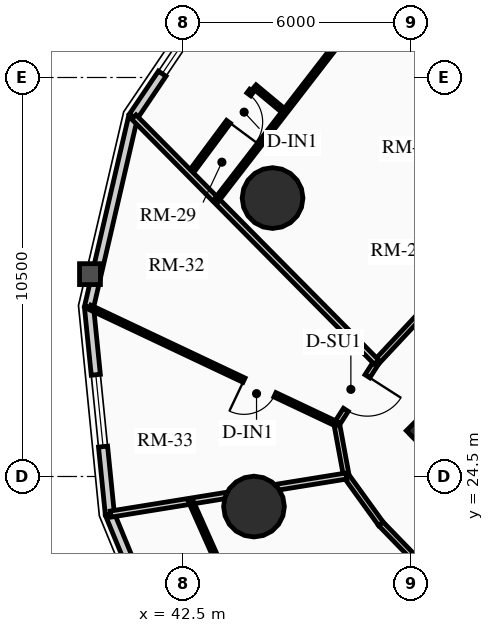
"""IFC4 building model, lengths in metres.
Left out: names, types, materials, properties, quantities, classifications, styles, units other than length and angle.
Written with IfcOpenShell. Run it as: python <this file> out.ifc"""

import sys

from ifc_helpers import new_model, si_unit, direction, frame, frame_2d, origin, origin_2d, place, context, subcontext, project, spatial, rectangle, circle, extrude, source, transform, mapped, element, fill, save


model = new_model("IFC4")
c1 = context("Model", 3, precision=1e-05, world=origin(), true_north=direction((0.0, 1.0)))
c2 = subcontext(c1, "Body", "Model", "MODEL_VIEW")
j1 = project(units=[si_unit("LENGTHUNIT", "METRE"), si_unit("PLANEANGLEUNIT", "RADIAN")], contexts=[c1])
p1 = place(None, origin())
s1 = spatial("IfcSite", under=j1, at=p1, CompositionType="ELEMENT")
p2 = place(p1, origin())
s2 = spatial("IfcBuilding", under=s1, at=p2, CompositionType="ELEMENT")
p3 = place(p2, frame((0.0, 0.0, 62.74)))
s3 = spatial("IfcBuildingStorey", under=s2, at=p3, CompositionType="ELEMENT", Elevation=62.74)
p4 = place(p3, frame((58.773, 15.661, 0.0), z_axis=(0.0, 0.0, 1.0), x_axis=(-0.707106781187, 0.707106781187, 0.0)))
e1 = element("IfcWall", 1, at=p4, inside=s3, PredefinedType="SHEAR", context=c2, shape_type="SweptSolid", body=[
    extrude(rectangle(XDim=14.3, YDim=0.5, at=frame_2d((7.15, 0.0))), origin(), (0.0, 0.0, 1.0), 2.91),
])
p5 = place(p3, frame((48.976, 25.706, 0.0), z_axis=(0.0, 0.0, 1.0), x_axis=(0.707106781187, 0.707106781187, 0.0)))
e2 = element("IfcColumn", 2, at=p5, inside=s3, PredefinedType="COLUMN", context=c2, shape_type="SweptSolid", body=[
    extrude(rectangle(XDim=0.85, YDim=0.85, at=origin_2d()), origin(), (0.0, 0.0, 1.0), 2.91),
])
for number, where, z_axis, x_axis in (
    (3, (44.854, 31.827, 0.0), (0.0, 0.0, 1.0), (1.0, 0.0, 0.0)),
    (4, (44.365, 23.709, 0.0), (0.0, 0.0, 1.0), (1.0, 0.0, 0.0)),
):
    element("IfcColumn", number, at=place(p3, frame(where, z_axis=z_axis, x_axis=x_axis)), inside=s3, PredefinedType="USERDEFINED", context=c2, shape_type="SweptSolid", body=[
        extrude(circle(Radius=0.8, at=origin_2d()), origin(), (0.0, 0.0, 1.0), 2.91),
    ])
p6 = place(p3, frame((41.186, 33.969, 0.0), z_axis=(0.0, 0.0, 1.0), x_axis=(0.559638693991, 0.828736708604, 0.0)))
e5 = element("IfcWall", 5, at=p6, inside=s3, PredefinedType="SOLIDWALL", context=c2, shape_type="SweptSolid", body=[
    extrude(rectangle(XDim=4.93, YDim=0.24, at=frame_2d((2.465, 0.0))), origin(), (0.0, 0.0, 1.0), 2.079),
])
m1 = source(origin(), c2, "Body", "SweptSolid", [
    extrude(rectangle(XDim=2.2, YDim=1.35, at=frame_2d((1.1, 0.675))), frame((0.0, 0.13, 0.0), z_axis=(0.0, -1.0, 0.0), x_axis=(1.0, 0.0, 0.0)), (0.0, 0.0, 1.0), 0.26),
])
p7 = place(p6, frame((1.365, 0.0, 0.65)))
e6 = element("IfcOpeningElement", 6, at=p7, cuts=e5, PredefinedType="OPENING", context=c2, shape_type="MappedRepresentation", body=[
    mapped(m1, transform((0.0, 0.0, 0.0), x_axis=(1.0, 0.0, 0.0), y_axis=(0.0, 1.0, 0.0), z_axis=(0.0, 0.0, 1.0), scale=1.0)),
])
p8 = place(p3, frame((40.024, 28.957, 0.0), z_axis=(0.0, 0.0, 1.0), x_axis=(0.225833060959, 0.974166016949, 0.0)))
e7 = element("IfcWall", 7, at=p8, inside=s3, PredefinedType="SOLIDWALL", context=c2, shape_type="SweptSolid", body=[
    extrude(rectangle(XDim=5.146, YDim=0.24, at=frame_2d((2.573, 0.0))), origin(), (0.0, 0.0, 1.0), 2.079),
])
p9 = place(p3, frame((40.572, 23.507, 0.0), z_axis=(0.0, 0.0, 1.0), x_axis=(-0.100165739718, 0.994970765694, 0.0)))
e8 = element("IfcWall", 8, at=p9, inside=s3, PredefinedType="SOLIDWALL", context=c2, shape_type="SweptSolid", body=[
    extrude(rectangle(XDim=5.477, YDim=0.24, at=frame_2d((2.738, 0.0))), origin(), (0.0, 0.0, 1.0), 2.079),
])
m2 = source(origin(), c2, "Body", "SweptSolid", [
    extrude(rectangle(XDim=1.9, YDim=1.35, at=frame_2d((0.95, 0.675))), frame((0.0, 0.13, 0.0), z_axis=(0.0, -1.0, 0.0), x_axis=(1.0, 0.0, 0.0)), (0.0, 0.0, 1.0), 0.26),
])
p10 = place(p9, frame((1.788, 0.0, 0.65)))
e9 = element("IfcOpeningElement", 9, at=p10, cuts=e8, PredefinedType="OPENING", context=c2, shape_type="MappedRepresentation", body=[
    mapped(m2, transform((0.0, 0.0, 0.0), x_axis=(1.0, 0.0, 0.0), y_axis=(0.0, 1.0, 0.0), z_axis=(0.0, 0.0, 1.0), scale=1.0)),
])
p11 = place(p3, frame((42.778, 18.156, 0.0), z_axis=(0.0, 0.0, 1.0), x_axis=(-0.381027682565, 0.924563629567, 0.0)))
e10 = element("IfcWall", 10, at=p11, inside=s3, PredefinedType="SOLIDWALL", context=c2, shape_type="SweptSolid", body=[
    extrude(rectangle(XDim=5.789, YDim=0.24, at=frame_2d((2.894, 0.0))), origin(), (0.0, 0.0, 1.0), 2.079),
])
p12 = place(p11, frame((1.794, 0.0, 0.65)))
e11 = element("IfcOpeningElement", 11, at=p12, cuts=e10, PredefinedType="OPENING", context=c2, shape_type="MappedRepresentation", body=[
    mapped(m1, transform((0.0, 0.0, 0.0), x_axis=(1.0, 0.0, 0.0), y_axis=(0.0, 1.0, 0.0), z_axis=(0.0, 0.0, 1.0), scale=1.0)),
])
p13 = place(p3, frame((52.043, 32.28, 0.0), z_axis=(0.0, 0.0, 1.0), x_axis=(-0.682606081633, -0.730786519661, 0.0)))
e12 = element("IfcWall", 12, at=p13, inside=s3, PredefinedType="PARTITIONING", context=c2, shape_type="SweptSolid", body=[
    extrude(rectangle(XDim=6.527, YDim=0.15, at=frame_2d((3.263, 0.0))), origin(), (0.0, 0.0, 1.0), 2.079),
])
p14 = place(p3, frame((47.588, 27.51, 0.0), z_axis=(0.0, 0.0, 1.0), x_axis=(-0.540202619347, -0.841534984449, 0.0)))
e13 = element("IfcWall", 13, at=p14, inside=s3, PredefinedType="PARTITIONING", context=c2, shape_type="SweptSolid", body=[
    extrude(rectangle(XDim=1.935, YDim=0.15, at=frame_2d((0.967, 0.0))), origin(), (0.0, 0.0, 1.0), 2.079),
])
m3 = source(origin(), c2, "Body", "SweptSolid", [
    extrude(rectangle(XDim=1.05, YDim=2.015, at=frame_2d((0.525, 1.007))), frame((0.0, 0.085, 0.0), z_axis=(0.0, -1.0, 0.0), x_axis=(1.0, 0.0, 0.0)), (0.0, 0.0, 1.0), 0.17),
])
p15 = place(p14, frame((0.442, 0.0, 0.0)))
e14 = element("IfcOpeningElement", 14, at=p15, cuts=e13, PredefinedType="OPENING", context=c2, shape_type="MappedRepresentation", body=[
    mapped(m3, transform((0.0, 0.0, 0.0), x_axis=(1.0, 0.0, 0.0), y_axis=(0.0, 1.0, 0.0), z_axis=(0.0, 0.0, 1.0), scale=1.0)),
])
p16 = place(p3, frame((46.543, 25.882, 0.0), z_axis=(0.0, 0.0, 1.0), x_axis=(0.181153502579, -0.983454832976, 0.0)))
e15 = element("IfcWall", 15, at=p16, inside=s3, PredefinedType="PARTITIONING", context=c2, shape_type="SweptSolid", body=[
    extrude(rectangle(XDim=1.392, YDim=0.15, at=frame_2d((0.696, 0.0))), origin(), (0.0, 0.0, 1.0), 2.079),
])
p17 = place(p3, frame((46.795, 24.513, 0.0), z_axis=(0.0, 0.0, 1.0), x_axis=(0.585628197524, -0.810579801294, 0.0)))
e16 = element("IfcWall", 16, at=p17, inside=s3, PredefinedType="PARTITIONING", context=c2, shape_type="SweptSolid", body=[
    extrude(rectangle(XDim=1.554, YDim=0.15, at=frame_2d((0.777, 0.0))), origin(), (0.0, 0.0, 1.0), 2.125),
])
p18 = place(p3, frame((47.706, 23.253, 0.0), z_axis=(0.0, 0.0, 1.0), x_axis=(0.696179266346, -0.717867974707, 0.0)))
e17 = element("IfcWall", 17, at=p18, inside=s3, PredefinedType="PARTITIONING", context=c2, shape_type="SweptSolid", body=[
    extrude(rectangle(XDim=6.045, YDim=0.15, at=frame_2d((3.022, 0.0))), origin(), (0.0, 0.0, 1.0), 2.555),
])
p19 = place(p3, frame((47.588, 27.51, 0.0), z_axis=(0.0, 0.0, 1.0), x_axis=(-0.703506421614, 0.710688901523, 0.0)))
e18 = element("IfcWall", 18, at=p19, inside=s3, PredefinedType="PARTITIONING", context=c2, shape_type="SweptSolid", body=[
    extrude(rectangle(XDim=9.076, YDim=0.16, at=frame_2d((4.538, 0.0))), origin(), (0.0, 0.0, 1.0), 2.079),
])
p20 = place(p3, frame((46.795, 24.513, 0.0), z_axis=(0.0, 0.0, 1.0), x_axis=(-0.987194583954, -0.159520699005, 0.0)))
e19 = element("IfcWall", 19, at=p20, inside=s3, PredefinedType="PARTITIONING", context=c2, shape_type="SweptSolid", body=[
    extrude(rectangle(XDim=6.284, YDim=0.16, at=frame_2d((3.142, 0.0))), origin(), (0.0, 0.0, 1.0), 2.079),
])
p21 = place(p3, frame((46.708, 36.082, 0.0), z_axis=(0.0, 0.0, 1.0), x_axis=(-0.611308591704, -0.791392320982, 0.0)))
e20 = element("IfcWall", 20, at=p21, inside=s3, PredefinedType="PARTITIONING", context=c2, shape_type="SweptSolid", body=[
    extrude(rectangle(XDim=5.453, YDim=0.125, at=frame_2d((2.726, 0.0))), origin(), (0.0, 0.0, 1.0), 2.079),
])
p22 = place(p3, frame((45.1, 34.159, 0.0), z_axis=(0.0, 0.0, 1.0), x_axis=(-0.768669758301, 0.639645841598, 0.0)))
e21 = element("IfcWall", 21, at=p22, inside=s3, PredefinedType="PARTITIONING", context=c2, shape_type="SweptSolid", body=[
    extrude(rectangle(XDim=0.937, YDim=0.125, at=frame_2d((0.468, 0.0))), origin(), (0.0, 0.0, 1.0), 2.555),
])
p23 = place(p3, frame((44.301, 34.653, 0.0), z_axis=(0.0, 0.0, 1.0), x_axis=(-0.59612539604, -0.802891345199, 0.0)))
e22 = element("IfcWall", 22, at=p23, inside=s3, PredefinedType="PARTITIONING", context=c2, shape_type="SweptSolid", body=[
    extrude(rectangle(XDim=2.535, YDim=0.125, at=frame_2d((1.268, 0.0))), origin(), (0.0, 0.0, 1.0), 2.079),
])
m4 = source(origin(), c2, "Body", "SweptSolid", [
    extrude(rectangle(XDim=0.9, YDim=2.005, at=frame_2d((0.45, 1.002))), frame((0.0, 0.073, 0.0), z_axis=(0.0, -1.0, 0.0), x_axis=(1.0, 0.0, 0.0)), (0.0, 0.0, 1.0), 0.145),
])
p24 = place(p23, frame((0.12, 0.0, 0.0)))
e23 = element("IfcOpeningElement", 23, at=p24, cuts=e22, PredefinedType="OPENING", context=c2, shape_type="MappedRepresentation", body=[
    mapped(m4, transform((0.0, 0.0, 0.0), x_axis=(1.0, 0.0, 0.0), y_axis=(0.0, 1.0, 0.0), z_axis=(0.0, 0.0, 1.0), scale=1.0)),
])
p25 = place(p3, frame((46.543, 25.882, 0.0), z_axis=(0.0, 0.0, 1.0), x_axis=(-0.904143350922, 0.427229213635, 0.0)))
e24 = element("IfcWall", 24, at=p25, inside=s3, PredefinedType="PARTITIONING", context=c2, shape_type="SweptSolid", body=[
    extrude(rectangle(XDim=7.189, YDim=0.125, at=frame_2d((3.594, 0.0))), origin(), (0.0, 0.0, 1.0), 2.079),
])
p26 = place(p25, frame((1.8, 0.0, 0.0)))
e25 = element("IfcOpeningElement", 25, at=p26, cuts=e24, PredefinedType="OPENING", context=c2, shape_type="MappedRepresentation", body=[
    mapped(m4, transform((0.0, 0.0, 0.0), x_axis=(1.0, 0.0, 0.0), y_axis=(0.0, 1.0, 0.0), z_axis=(0.0, 0.0, 1.0), scale=1.0)),
])
p27 = place(p3, frame((42.701, 23.851, 0.0), z_axis=(0.0, 0.0, 1.0), x_axis=(0.407189252031, -0.913343808777, 0.0)))
e26 = element("IfcWall", 26, at=p27, inside=s3, PredefinedType="PARTITIONING", context=c2, shape_type="SweptSolid", body=[
    extrude(rectangle(XDim=4.332, YDim=0.125, at=frame_2d((2.166, 0.0))), origin(), (0.0, 0.0, 1.0), 2.079),
])
m5 = source(origin(), c2, "Body", "SweptSolid", [
    extrude(rectangle(XDim=2.2, YDim=1.35, at=frame_2d((1.1, 0.675))), frame((0.0, 0.03, 0.0), z_axis=(0.0, -1.0, 0.0), x_axis=(1.0, 0.0, 0.0)), (0.0, 0.0, 1.0), 0.06),
])
p28 = place(p7, origin())
e27 = element("IfcWindow", 27, at=p28, inside=s3, PartitioningType="DOUBLE_PANEL_VERTICAL", PredefinedType="WINDOW", context=c2, shape_type="MappedRepresentation", body=[
    mapped(m5, transform((0.0, 0.0, 0.0), x_axis=(1.0, 0.0, 0.0), y_axis=(0.0, 1.0, 0.0), z_axis=(0.0, 0.0, 1.0), scale=1.0)),
])
fill(e6, e27)
m6 = source(origin(), c2, "Body", "SweptSolid", [
    extrude(rectangle(XDim=1.9, YDim=1.35, at=frame_2d((0.95, 0.675))), frame((0.0, 0.03, 0.0), z_axis=(0.0, -1.0, 0.0), x_axis=(1.0, 0.0, 0.0)), (0.0, 0.0, 1.0), 0.06),
])
p29 = place(p10, origin())
e28 = element("IfcWindow", 28, at=p29, inside=s3, PartitioningType="DOUBLE_PANEL_VERTICAL", PredefinedType="WINDOW", context=c2, shape_type="MappedRepresentation", body=[
    mapped(m6, transform((0.0, 0.0, 0.0), x_axis=(1.0, 0.0, 0.0), y_axis=(0.0, 1.0, 0.0), z_axis=(0.0, 0.0, 1.0), scale=1.0)),
])
fill(e9, e28)
m7 = source(origin(), c2, "Body", "SweptSolid", [
    extrude(rectangle(XDim=0.9, YDim=2.005, at=frame_2d((0.45, 1.002))), frame((0.0, 0.025, 0.0), z_axis=(0.0, -1.0, 0.0), x_axis=(1.0, 0.0, 0.0)), (0.0, 0.0, 1.0), 0.05),
])
p30 = place(p24, origin())
e29 = element("IfcDoor", 29, at=p30, inside=s3, OperationType="SINGLE_SWING_RIGHT", PredefinedType="DOOR", context=c2, shape_type="MappedRepresentation", body=[
    mapped(m7, transform((0.0, 0.0, 0.0), x_axis=(1.0, 0.0, 0.0), y_axis=(0.0, 1.0, 0.0), z_axis=(0.0, 0.0, 1.0), scale=1.0)),
])
fill(e23, e29)
m8 = source(origin(), c2, "Body", "SweptSolid", [
    extrude(rectangle(XDim=1.05, YDim=2.015, at=frame_2d((0.525, 1.007))), frame((0.0, 0.025, 0.0), z_axis=(0.0, -1.0, 0.0), x_axis=(1.0, 0.0, 0.0)), (0.0, 0.0, 1.0), 0.05),
])
p31 = place(p15, origin())
e30 = element("IfcDoor", 30, at=p31, inside=s3, OperationType="SINGLE_SWING_LEFT", PredefinedType="DOOR", context=c2, shape_type="MappedRepresentation", body=[
    mapped(m8, transform((0.0, 0.0, 0.0), x_axis=(1.0, 0.0, 0.0), y_axis=(0.0, 1.0, 0.0), z_axis=(0.0, 0.0, 1.0), scale=1.0)),
])
fill(e14, e30)
p32 = place(p26, origin())
e31 = element("IfcDoor", 31, at=p32, inside=s3, OperationType="SINGLE_SWING_RIGHT", PredefinedType="DOOR", context=c2, shape_type="MappedRepresentation", body=[
    mapped(m7, transform((0.0, 0.0, 0.0), x_axis=(1.0, 0.0, 0.0), y_axis=(0.0, 1.0, 0.0), z_axis=(0.0, 0.0, 1.0), scale=1.0)),
])
fill(e25, e31)
save(model, sys.argv[1])
